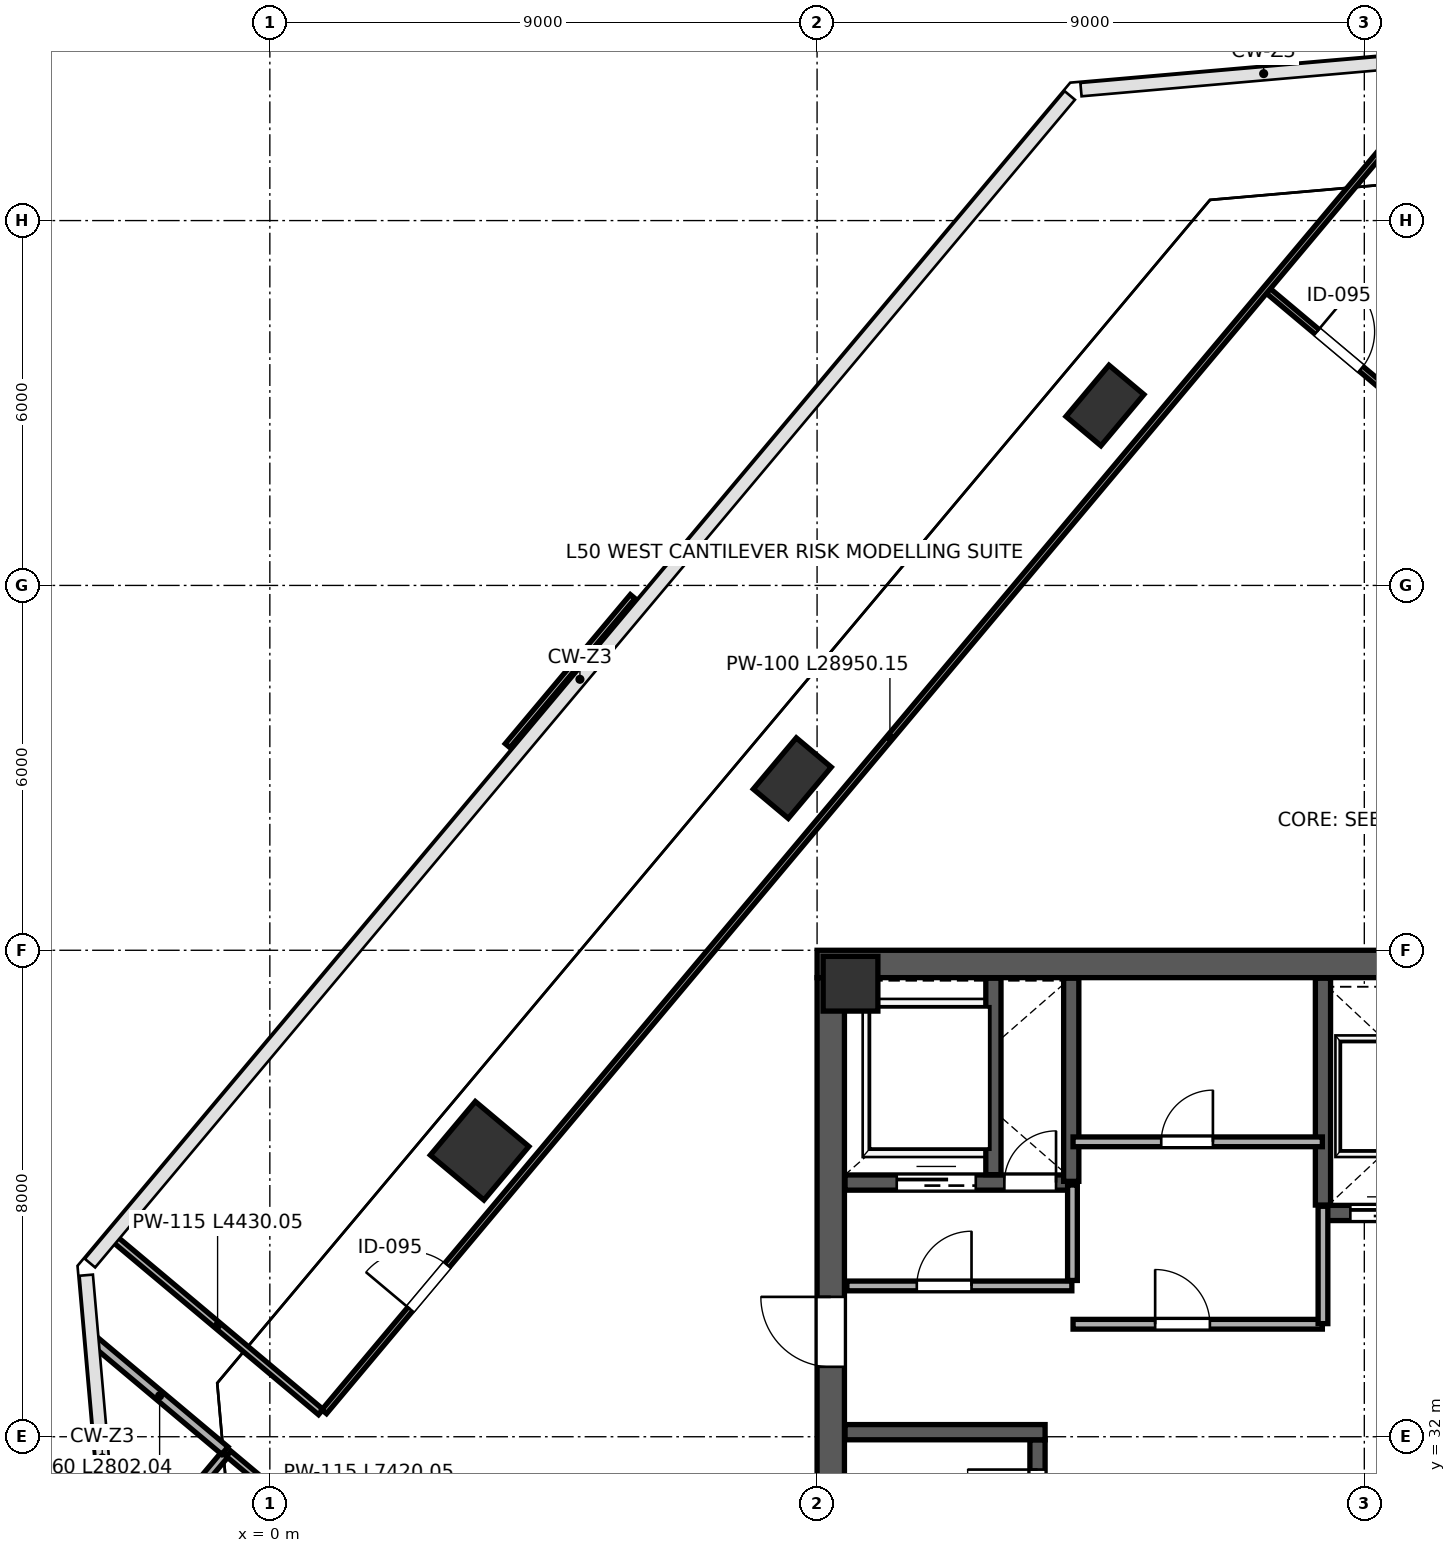
"""IFC4 building model, lengths in metres.
Left out: names, types, materials, properties, quantities, classifications, styles, units other than length and angle.
Written with IfcOpenShell. Run it as: python <this file> out.ifc"""

import sys

from ifc_helpers import new_model, si_unit, direction, frame, frame_2d, origin, origin_2d, place, context, subcontext, project, spatial, rectangle, extrude, clip, halfspace, source, transform, mapped, element, fill, save


model = new_model("IFC4")
c1 = context("Model", 3, precision=1e-05, world=origin(), true_north=direction((0.0, 1.0)))
c2 = subcontext(c1, "Body", "Model", "MODEL_VIEW")
j1 = project(units=[si_unit("LENGTHUNIT", "METRE"), si_unit("PLANEANGLEUNIT", "RADIAN")], contexts=[c1])
p1 = place(None, origin())
s1 = spatial("IfcSite", under=j1, at=p1, CompositionType="ELEMENT")
p2 = place(p1, origin())
s2 = spatial("IfcBuilding", under=s1, at=p2, CompositionType="ELEMENT")
p3 = place(p2, frame((0.0, 0.0, 224.8)))
s3 = spatial("IfcBuildingStorey", under=s2, at=p3, CompositionType="ELEMENT", Elevation=224.8)
m1 = source(origin(), c2, "Body", "SweptSolid", [
    extrude(rectangle(XDim=0.9, YDim=0.9, at=origin_2d()), origin(), (0.0, 0.0, 1.0), 4.198),
])
p4 = place(p3, frame((9.55, 39.45, 0.001), z_axis=(0.0, 0.0, 1.0), x_axis=(1.0, 0.0, 0.0)))
e1 = element("IfcColumn", 1, at=p4, inside=s3, PredefinedType="COLUMN", context=c2, shape_type="MappedRepresentation", body=[
    mapped(m1, transform((0.0, 0.0, 0.0), scale=1.0)),
])
p5 = place(p3, frame((3.45, 36.703, 0.0), z_axis=(0.051931693656, 0.183016419292, 0.981737281284), x_axis=(0.564688401119, -0.816194452339, 0.122285017941)))
e2 = element("IfcColumn", 2, at=p5, inside=s3, PredefinedType="COLUMN", context=c2, shape_type="Clipping", body=[
    clip(clip(extrude(rectangle(XDim=1.15, YDim=1.15, at=origin_2d()), origin(), (0.0, 0.0, 1.0), 4.278), halfspace(frame((0.0, 0.0, 0.158), z_axis=(0.0, 0.0, -1.0), x_axis=(1.0, 0.0, 0.0)), False)), halfspace(frame((0.0, 0.0, 4.12), z_axis=(0.0, 0.0, 1.0), x_axis=(1.0, 0.0, 0.0)), False)),
])
p6 = place(p3, frame((8.592, 42.831, 0.0), z_axis=(0.113659068215, 0.129634322639, 0.985026171534), x_axis=(0.158585881385, -0.98110626756, 0.110819718375)))
e3 = element("IfcColumn", 3, at=p6, inside=s3, PredefinedType="PILASTER", context=c2, shape_type="Clipping", body=[
    clip(clip(extrude(rectangle(XDim=0.75, YDim=1.1, at=origin_2d()), origin(), (0.0, 0.0, 1.0), 4.264), halfspace(frame((0.0, 0.0, 0.117), z_axis=(0.0, 0.0, -1.0), x_axis=(1.0, 0.0, 0.0)), False)), halfspace(frame((0.0, 0.0, 4.147), z_axis=(0.0, 0.0, 1.0), x_axis=(1.0, 0.0, 0.0)), False)),
])
p7 = place(p3, frame((13.735, 48.959, 0.0), z_axis=(0.174627926851, 0.075443829836, 0.981739943011), x_axis=(-0.27548877962, -0.953495918212, 0.122276188427)))
e4 = element("IfcColumn", 4, at=p7, inside=s3, PredefinedType="PILASTER", context=c2, shape_type="Clipping", body=[
    clip(clip(extrude(rectangle(XDim=0.75, YDim=1.1, at=origin_2d()), origin(), (0.0, 0.0, 1.0), 4.278), halfspace(frame((0.0, 0.0, 0.129), z_axis=(0.0, 0.0, -1.0), x_axis=(1.0, 0.0, 0.0)), False)), halfspace(frame((0.0, 0.0, 4.149), z_axis=(0.0, 0.0, 1.0), x_axis=(1.0, 0.0, 0.0)), False)),
])
p8 = place(p3, frame((9.225, 24.45, 0.0), z_axis=(0.0, 0.0, 1.0), x_axis=(0.0, 1.0, 0.0)))
e5 = element("IfcWall", 5, at=p8, inside=s3, PredefinedType="SHEAR", context=c2, shape_type="SweptSolid", body=[
    extrude(rectangle(XDim=15.1, YDim=0.45, at=frame_2d((7.55, 0.0))), origin(), (0.0, 0.0, 1.0), 3.96),
])
p9 = place(p8, frame((8.7, 0.0, 0.0)))
e6 = element("IfcOpeningElement", 6, at=p9, cuts=e5, PredefinedType="OPENING", context=c2, shape_type="SweptSolid", body=[
    extrude(rectangle(XDim=1.15, YDim=2.2, at=frame_2d((0.575, 1.1))), frame((0.0, 0.235, 0.0), z_axis=(0.0, -1.0, 0.0), x_axis=(1.0, 0.0, 0.0)), (0.0, 0.0, 1.0), 0.47),
])
p10 = place(p3, frame((9.0, 39.775, 0.0), z_axis=(0.0, 0.0, 1.0), x_axis=(1.0, 0.0, 0.0)))
e7 = element("IfcWall", 7, at=p10, inside=s3, PredefinedType="SHEAR", context=c2, shape_type="SweptSolid", body=[
    extrude(rectangle(XDim=18.0, YDim=0.45, at=frame_2d((9.0, 0.0))), origin(), (0.0, 0.0, 1.0), 3.96),
])
p11 = place(p3, frame((12.625, 24.46, 0.0), z_axis=(0.0, 0.0, 1.0), x_axis=(0.0, 1.0, 0.0)))
e8 = element("IfcWall", 8, at=p11, inside=s3, PredefinedType="SHEAR", context=c2, shape_type="SweptSolid", body=[
    extrude(rectangle(XDim=7.49, YDim=0.25, at=frame_2d((3.745, 0.0))), origin(), (0.0, 0.0, 1.0), 3.96),
])
p12 = place(p11, frame((5.85, 0.0, 0.0)))
e9 = element("IfcOpeningElement", 9, at=p12, cuts=e8, PredefinedType="OPENING", context=c2, shape_type="SweptSolid", body=[
    extrude(rectangle(XDim=1.15, YDim=2.2, at=frame_2d((0.575, 1.1))), frame((0.0, 0.135, 0.0), z_axis=(0.0, -1.0, 0.0), x_axis=(1.0, 0.0, 0.0)), (0.0, 0.0, 1.0), 0.27),
])
p13 = place(p3, frame((9.46, 32.075, 0.0), z_axis=(0.0, 0.0, 1.0), x_axis=(1.0, 0.0, 0.0)))
e10 = element("IfcWall", 10, at=p13, inside=s3, PredefinedType="SHEAR", context=c2, shape_type="SweptSolid", body=[
    extrude(rectangle(XDim=3.29, YDim=0.25, at=frame_2d((1.645, 0.0))), origin(), (0.0, 0.0, 1.0), 3.96),
])
p14 = place(p3, frame((9.46, 36.18, 0.0), z_axis=(0.0, 0.0, 1.0), x_axis=(1.0, 0.0, 0.0)))
e11 = element("IfcWall", 11, at=p14, inside=s3, PredefinedType="SHEAR", context=c2, shape_type="SweptSolid", body=[
    extrude(rectangle(XDim=3.79, YDim=0.25, at=frame_2d((1.895, 0.0))), origin(), (0.0, 0.0, 1.0), 3.96),
])
p15 = place(p14, frame((2.62, 0.0, 0.0)))
e12 = element("IfcOpeningElement", 12, at=p15, cuts=e11, PredefinedType="OPENING", context=c2, shape_type="SweptSolid", body=[
    extrude(rectangle(XDim=0.85, YDim=2.1, at=frame_2d((0.425, 1.05))), frame((0.0, 0.135, 0.0), z_axis=(0.0, -1.0, 0.0), x_axis=(1.0, 0.0, 0.0)), (0.0, 0.0, 1.0), 0.27),
])
p16 = place(p14, frame((0.85, 0.0, 0.0)))
e13 = element("IfcOpeningElement", 13, at=p16, cuts=e11, PredefinedType="OPENING", context=c2, shape_type="SweptSolid", body=[
    extrude(rectangle(XDim=1.3, YDim=2.25, at=frame_2d((0.65, 1.125))), frame((0.0, 0.135, 0.0), z_axis=(0.0, -1.0, 0.0), x_axis=(1.0, 0.0, 0.0)), (0.0, 0.0, 1.0), 0.27),
])
p17 = place(p3, frame((11.9, 36.31, 0.0), z_axis=(0.0, 0.0, 1.0), x_axis=(0.0, 1.0, 0.0)))
e14 = element("IfcWall", 14, at=p17, inside=s3, PredefinedType="SHEAR", context=c2, shape_type="SweptSolid", body=[
    extrude(rectangle(XDim=3.23, YDim=0.25, at=frame_2d((1.615, 0.0))), origin(), (0.0, 0.0, 1.0), 3.96),
])
p18 = place(p3, frame((13.18, 36.2, 0.0), z_axis=(0.0, 0.0, 1.0), x_axis=(0.0, 1.0, 0.0)))
e15 = element("IfcWall", 15, at=p18, inside=s3, PredefinedType="SHEAR", context=c2, shape_type="SweptSolid", body=[
    extrude(rectangle(XDim=3.34, YDim=0.25, at=frame_2d((1.67, 0.0))), origin(), (0.0, 0.0, 1.0), 3.96),
])
p19 = place(p3, frame((17.32, 35.68, 0.0), z_axis=(0.0, 0.0, 1.0), x_axis=(1.0, 0.0, 0.0)))
e16 = element("IfcWall", 16, at=p19, inside=s3, PredefinedType="SHEAR", context=c2, shape_type="SweptSolid", body=[
    extrude(rectangle(XDim=3.87, YDim=0.25, at=frame_2d((1.935, 0.0))), origin(), (0.0, 0.0, 1.0), 3.96),
])
p20 = place(p19, frame((0.45, 0.0, 0.0)))
e17 = element("IfcOpeningElement", 17, at=p20, cuts=e16, PredefinedType="OPENING", context=c2, shape_type="SweptSolid", body=[
    extrude(rectangle(XDim=1.1, YDim=2.2, at=frame_2d((0.55, 1.1))), frame((0.0, 0.135, 0.0), z_axis=(0.0, -1.0, 0.0), x_axis=(1.0, 0.0, 0.0)), (0.0, 0.0, 1.0), 0.27),
])
p21 = place(p19, frame((2.35, 0.0, 0.0)))
e18 = element("IfcOpeningElement", 18, at=p21, cuts=e16, PredefinedType="OPENING", context=c2, shape_type="SweptSolid", body=[
    extrude(rectangle(XDim=1.1, YDim=2.2, at=frame_2d((0.55, 1.1))), frame((0.0, 0.135, 0.0), z_axis=(0.0, -1.0, 0.0), x_axis=(1.0, 0.0, 0.0)), (0.0, 0.0, 1.0), 0.27),
])
p22 = place(p3, frame((17.32, 35.81, 0.0), z_axis=(0.0, 0.0, 1.0), x_axis=(0.0, 1.0, 0.0)))
e19 = element("IfcWall", 19, at=p22, inside=s3, PredefinedType="SHEAR", context=c2, shape_type="SweptSolid", body=[
    extrude(rectangle(XDim=3.73, YDim=0.25, at=frame_2d((1.865, 0.0))), origin(), (0.0, 0.0, 1.0), 3.96),
])
p23 = place(p3, frame((9.49, 34.48, 0.0), z_axis=(0.0, 0.0, 1.0), x_axis=(1.0, 0.0, 0.0)))
e20 = element("IfcWall", 20, at=p23, inside=s3, PredefinedType="PARTITIONING", context=c2, shape_type="SweptSolid", body=[
    extrude(rectangle(XDim=3.7, YDim=0.16, at=frame_2d((1.85, 0.0))), origin(), (0.0, 0.0, 1.0), 3.96),
])
p24 = place(p23, frame((1.15, 0.0, 0.0)))
e21 = element("IfcOpeningElement", 21, at=p24, cuts=e20, PredefinedType="OPENING", context=c2, shape_type="SweptSolid", body=[
    extrude(rectangle(XDim=0.9, YDim=2.15, at=frame_2d((0.45, 1.075))), frame((0.0, 0.09, 0.0), z_axis=(0.0, -1.0, 0.0), x_axis=(1.0, 0.0, 0.0)), (0.0, 0.0, 1.0), 0.18),
])
p25 = place(p3, frame((13.2, 34.57, 0.0), z_axis=(0.0, 0.0, 1.0), x_axis=(0.0, 1.0, 0.0)))
e22 = element("IfcWall", 22, at=p25, inside=s3, PredefinedType="PARTITIONING", context=c2, shape_type="SweptSolid", body=[
    extrude(rectangle(XDim=1.57, YDim=0.16, at=frame_2d((0.785, 0.0))), origin(), (0.0, 0.0, 1.0), 3.96),
])
p26 = place(p3, frame((13.21, 33.85, 0.0), z_axis=(0.0, 0.0, 1.0), x_axis=(1.0, 0.0, 0.0)))
e23 = element("IfcWall", 23, at=p26, inside=s3, PredefinedType="PARTITIONING", context=c2, shape_type="SweptSolid", body=[
    extrude(rectangle(XDim=4.1, YDim=0.16, at=frame_2d((2.05, 0.0))), origin(), (0.0, 0.0, 1.0), 3.96),
])
p27 = place(p26, frame((1.35, 0.0, 0.0)))
e24 = element("IfcOpeningElement", 24, at=p27, cuts=e23, PredefinedType="OPENING", context=c2, shape_type="SweptSolid", body=[
    extrude(rectangle(XDim=0.9, YDim=2.15, at=frame_2d((0.45, 1.075))), frame((0.0, 0.09, 0.0), z_axis=(0.0, -1.0, 0.0), x_axis=(1.0, 0.0, 0.0)), (0.0, 0.0, 1.0), 0.18),
])
p28 = place(p3, frame((17.32, 33.86, 0.0), z_axis=(0.0, 0.0, 1.0), x_axis=(0.0, 1.0, 0.0)))
e25 = element("IfcWall", 25, at=p28, inside=s3, PredefinedType="PARTITIONING", context=c2, shape_type="SweptSolid", body=[
    extrude(rectangle(XDim=1.93, YDim=0.16, at=frame_2d((0.965, 0.0))), origin(), (0.0, 0.0, 1.0), 3.96),
])
p29 = place(p3, frame((13.21, 36.85, 0.0), z_axis=(0.0, 0.0, 1.0), x_axis=(1.0, 0.0, 0.0)))
e26 = element("IfcWall", 26, at=p29, inside=s3, PredefinedType="PARTITIONING", context=c2, shape_type="SweptSolid", body=[
    extrude(rectangle(XDim=4.1, YDim=0.16, at=frame_2d((2.05, 0.0))), origin(), (0.0, 0.0, 1.0), 3.96),
])
p30 = place(p29, frame((1.45, 0.0, 0.0)))
e27 = element("IfcOpeningElement", 27, at=p30, cuts=e26, PredefinedType="OPENING", context=c2, shape_type="SweptSolid", body=[
    extrude(rectangle(XDim=0.85, YDim=2.1, at=frame_2d((0.425, 1.05))), frame((0.0, 0.09, 0.0), z_axis=(0.0, -1.0, 0.0), x_axis=(1.0, 0.0, 0.0)), (0.0, 0.0, 1.0), 0.18),
])
p31 = place(p3, frame((-2.536, 29.569, 0.0), z_axis=(0.0, 0.0, 1.0), x_axis=(0.642777228426, 0.766053153911, 0.0)))
e28 = element("IfcWall", 28, at=p31, inside=s3, PredefinedType="PARTITIONING", context=c2, shape_type="SweptSolid", body=[
    extrude(rectangle(XDim=2.802, YDim=0.135, at=frame_2d((1.401, 0.0))), origin(), (0.0, 0.0, 1.0), 3.96),
])
p32 = place(p3, frame((-2.886, 33.573, 0.0), z_axis=(0.0, 0.0, 1.0), x_axis=(0.766060058075, -0.642769000048, 0.0)))
e29 = element("IfcWall", 29, at=p32, inside=s3, PredefinedType="PARTITIONING", context=c2, shape_type="SweptSolid", body=[
    extrude(rectangle(XDim=2.802, YDim=0.16, at=frame_2d((1.401, 0.0))), origin(), (0.0, 0.0, 1.0), 3.96),
])
p33 = place(p3, frame((-0.678, 31.721, 0.0), z_axis=(0.0, 0.0, 1.0), x_axis=(0.766043108328, -0.642789200425, 0.0)))
e30 = element("IfcWall", 30, at=p33, inside=s3, PredefinedType="PARTITIONING", context=c2, shape_type="SweptSolid", body=[
    extrude(rectangle(XDim=7.42, YDim=0.115, at=frame_2d((3.71, 0.0))), origin(), (0.0, 0.0, 1.0), 3.96),
])
p34 = place(p33, frame((2.9, 0.0, 0.0)))
e31 = element("IfcOpeningElement", 31, at=p34, cuts=e30, PredefinedType="OPENING", context=c2, shape_type="SweptSolid", body=[
    extrude(rectangle(XDim=0.9, YDim=2.15, at=frame_2d((0.45, 1.075))), frame((0.0, 0.067, 0.0), z_axis=(0.0, -1.0, 0.0), x_axis=(1.0, 0.0, 0.0)), (0.0, 0.0, 1.0), 0.135),
])
p35 = place(p33, frame((5.0, 0.0, 0.0)))
e32 = element("IfcOpeningElement", 32, at=p35, cuts=e30, PredefinedType="OPENING", context=c2, shape_type="SweptSolid", body=[
    extrude(rectangle(XDim=0.95, YDim=2.15, at=frame_2d((0.475, 1.075))), frame((0.0, 0.067, 0.0), z_axis=(0.0, -1.0, 0.0), x_axis=(1.0, 0.0, 0.0)), (0.0, 0.0, 1.0), 0.135),
])
p36 = place(p3, frame((16.416, 50.848, 0.0), z_axis=(0.0, 0.0, 1.0), x_axis=(0.766043174175, -0.642789121951, 0.0)))
e33 = element("IfcWall", 33, at=p36, inside=s3, PredefinedType="PARTITIONING", context=c2, shape_type="SweptSolid", body=[
    extrude(rectangle(XDim=22.27, YDim=0.1, at=frame_2d((11.135, 0.0))), origin(), (0.0, 0.0, 1.0), 3.96),
])
p37 = place(p36, frame((1.05, 0.0, 0.0)))
e34 = element("IfcOpeningElement", 34, at=p37, cuts=e33, PredefinedType="OPENING", context=c2, shape_type="SweptSolid", body=[
    extrude(rectangle(XDim=0.95, YDim=2.15, at=frame_2d((0.475, 1.075))), frame((0.0, 0.06, 0.0), z_axis=(0.0, -1.0, 0.0), x_axis=(1.0, 0.0, 0.0)), (0.0, 0.0, 1.0), 0.12),
])
p38 = place(p36, frame((9.8, 0.0, 0.0)))
e35 = element("IfcOpeningElement", 35, at=p38, cuts=e33, PredefinedType="OPENING", context=c2, shape_type="SweptSolid", body=[
    extrude(rectangle(XDim=0.95, YDim=2.15, at=frame_2d((0.475, 1.075))), frame((0.0, 0.06, 0.0), z_axis=(0.0, -1.0, 0.0), x_axis=(1.0, 0.0, 0.0)), (0.0, 0.0, 1.0), 0.12),
])
p39 = place(p3, frame((-2.556, 35.254, 0.0), z_axis=(0.0, 0.0, 1.0), x_axis=(0.76603046424, -0.642804268698, 0.0)))
e36 = element("IfcWall", 36, at=p39, inside=s3, PredefinedType="PARTITIONING", context=c2, shape_type="SweptSolid", body=[
    extrude(rectangle(XDim=4.43, YDim=0.115, at=frame_2d((2.215, 0.0))), origin(), (0.0, 0.0, 1.0), 3.96),
])
p40 = place(p3, frame((0.894, 32.412, 0.0), z_axis=(0.0, 0.0, 1.0), x_axis=(0.642782006196, 0.766049144971, 0.0)))
e37 = element("IfcWall", 37, at=p40, inside=s3, PredefinedType="PARTITIONING", context=c2, shape_type="SweptSolid", body=[
    extrude(rectangle(XDim=28.95, YDim=0.1, at=frame_2d((14.475, 0.0))), origin(), (0.0, 0.0, 1.0), 3.96),
])
p41 = place(p40, frame((2.2, 0.0, 0.0)))
e38 = element("IfcOpeningElement", 38, at=p41, cuts=e37, PredefinedType="OPENING", context=c2, shape_type="SweptSolid", body=[
    extrude(rectangle(XDim=0.95, YDim=2.15, at=frame_2d((0.475, 1.075))), frame((0.0, 0.06, 0.0), z_axis=(0.0, -1.0, 0.0), x_axis=(1.0, 0.0, 0.0)), (0.0, 0.0, 1.0), 0.12),
])
m2 = source(origin(), c2, "Body", "SweptSolid", [
    extrude(rectangle(XDim=1.15, YDim=2.2, at=frame_2d((0.575, 1.1))), frame((0.0, 0.025, 0.0), z_axis=(0.0, -1.0, 0.0), x_axis=(1.0, 0.0, 0.0)), (0.0, 0.0, 1.0), 0.05),
])
p42 = place(p12, origin())
e39 = element("IfcDoor", 39, at=p42, inside=s3, OperationType="SINGLE_SWING_RIGHT", PredefinedType="DOOR", context=c2, shape_type="MappedRepresentation", body=[
    mapped(m2, transform((0.0, 0.0, 0.0), scale=1.0)),
])
fill(e9, e39)
m3 = source(origin(), c2, "Body", "SweptSolid", [
    extrude(rectangle(XDim=1.15, YDim=2.2, at=frame_2d((0.575, 1.1))), frame((0.0, 0.025, 0.0), z_axis=(0.0, -1.0, 0.0), x_axis=(1.0, 0.0, 0.0)), (0.0, 0.0, 1.0), 0.05),
])
p43 = place(p9, origin())
e40 = element("IfcDoor", 40, at=p43, inside=s3, OperationType="SINGLE_SWING_RIGHT", PredefinedType="DOOR", context=c2, shape_type="MappedRepresentation", body=[
    mapped(m3, transform((0.0, 0.0, 0.0), scale=1.0)),
])
fill(e6, e40)
m4 = source(origin(), c2, "Body", "SweptSolid", [
    extrude(rectangle(XDim=0.85, YDim=2.1, at=frame_2d((0.425, 1.05))), frame((0.0, 0.025, 0.0), z_axis=(0.0, -1.0, 0.0), x_axis=(1.0, 0.0, 0.0)), (0.0, 0.0, 1.0), 0.05),
])
p44 = place(p15, origin())
e41 = element("IfcDoor", 41, at=p44, inside=s3, OperationType="SINGLE_SWING_RIGHT", PredefinedType="DOOR", context=c2, shape_type="MappedRepresentation", body=[
    mapped(m4, transform((0.0, 0.0, 0.0), scale=1.0)),
])
fill(e12, e41)
m5 = source(origin(), c2, "Body", "SweptSolid", [
    extrude(rectangle(XDim=1.1, YDim=2.2, at=frame_2d((0.55, 1.1))), frame((0.0, 0.025, 0.0), z_axis=(0.0, -1.0, 0.0), x_axis=(1.0, 0.0, 0.0)), (0.0, 0.0, 1.0), 0.05),
])
p45 = place(p20, origin())
e42 = element("IfcDoor", 42, at=p45, inside=s3, OperationType="SLIDING_TO_LEFT", PredefinedType="DOOR", context=c2, shape_type="MappedRepresentation", body=[
    mapped(m5, transform((0.0, 0.0, 0.0), scale=1.0)),
])
fill(e17, e42)
m6 = source(origin(), c2, "Body", "SweptSolid", [
    extrude(rectangle(XDim=1.3, YDim=2.25, at=frame_2d((0.65, 1.125))), frame((0.0, 0.025, 0.0), z_axis=(0.0, -1.0, 0.0), x_axis=(1.0, 0.0, 0.0)), (0.0, 0.0, 1.0), 0.05),
])
p46 = place(p16, origin())
e43 = element("IfcDoor", 43, at=p46, inside=s3, OperationType="SLIDING_TO_LEFT", PredefinedType="DOOR", context=c2, shape_type="MappedRepresentation", body=[
    mapped(m6, transform((0.0, 0.0, 0.0), scale=1.0)),
])
fill(e13, e43)
m7 = source(origin(), c2, "Body", "SweptSolid", [
    extrude(rectangle(XDim=0.9, YDim=2.15, at=frame_2d((0.45, 1.075))), frame((0.0, 0.025, 0.0), z_axis=(0.0, -1.0, 0.0), x_axis=(1.0, 0.0, 0.0)), (0.0, 0.0, 1.0), 0.05),
])
p47 = place(p24, origin())
e44 = element("IfcDoor", 44, at=p47, inside=s3, OperationType="SINGLE_SWING_RIGHT", PredefinedType="DOOR", context=c2, shape_type="MappedRepresentation", body=[
    mapped(m7, transform((0.0, 0.0, 0.0), scale=1.0)),
])
fill(e21, e44)
p48 = place(p27, origin())
e45 = element("IfcDoor", 45, at=p48, inside=s3, OperationType="SINGLE_SWING_LEFT", PredefinedType="DOOR", context=c2, shape_type="MappedRepresentation", body=[
    mapped(m7, transform((0.0, 0.0, 0.0), scale=1.0)),
])
fill(e24, e45)
p49 = place(p30, origin())
e46 = element("IfcDoor", 46, at=p49, inside=s3, OperationType="SINGLE_SWING_RIGHT", PredefinedType="DOOR", context=c2, shape_type="MappedRepresentation", body=[
    mapped(m4, transform((0.0, 0.0, 0.0), scale=1.0)),
])
fill(e27, e46)
m8 = source(origin(), c2, "Body", "SweptSolid", [
    extrude(rectangle(XDim=0.95, YDim=2.15, at=frame_2d((0.475, 1.075))), frame((0.0, 0.025, 0.0), z_axis=(0.0, -1.0, 0.0), x_axis=(1.0, 0.0, 0.0)), (0.0, 0.0, 1.0), 0.05),
])
p50 = place(p37, origin())
e47 = element("IfcDoor", 47, at=p50, inside=s3, OperationType="SINGLE_SWING_LEFT", PredefinedType="DOOR", context=c2, shape_type="MappedRepresentation", body=[
    mapped(m8, transform((0.0, 0.0, 0.0), scale=1.0)),
])
fill(e34, e47)
p51 = place(p41, origin())
e48 = element("IfcDoor", 48, at=p51, inside=s3, OperationType="SINGLE_SWING_LEFT", PredefinedType="DOOR", context=c2, shape_type="MappedRepresentation", body=[
    mapped(m8, transform((0.0, 0.0, 0.0), scale=1.0)),
])
fill(e38, e48)
save(model, sys.argv[1])
